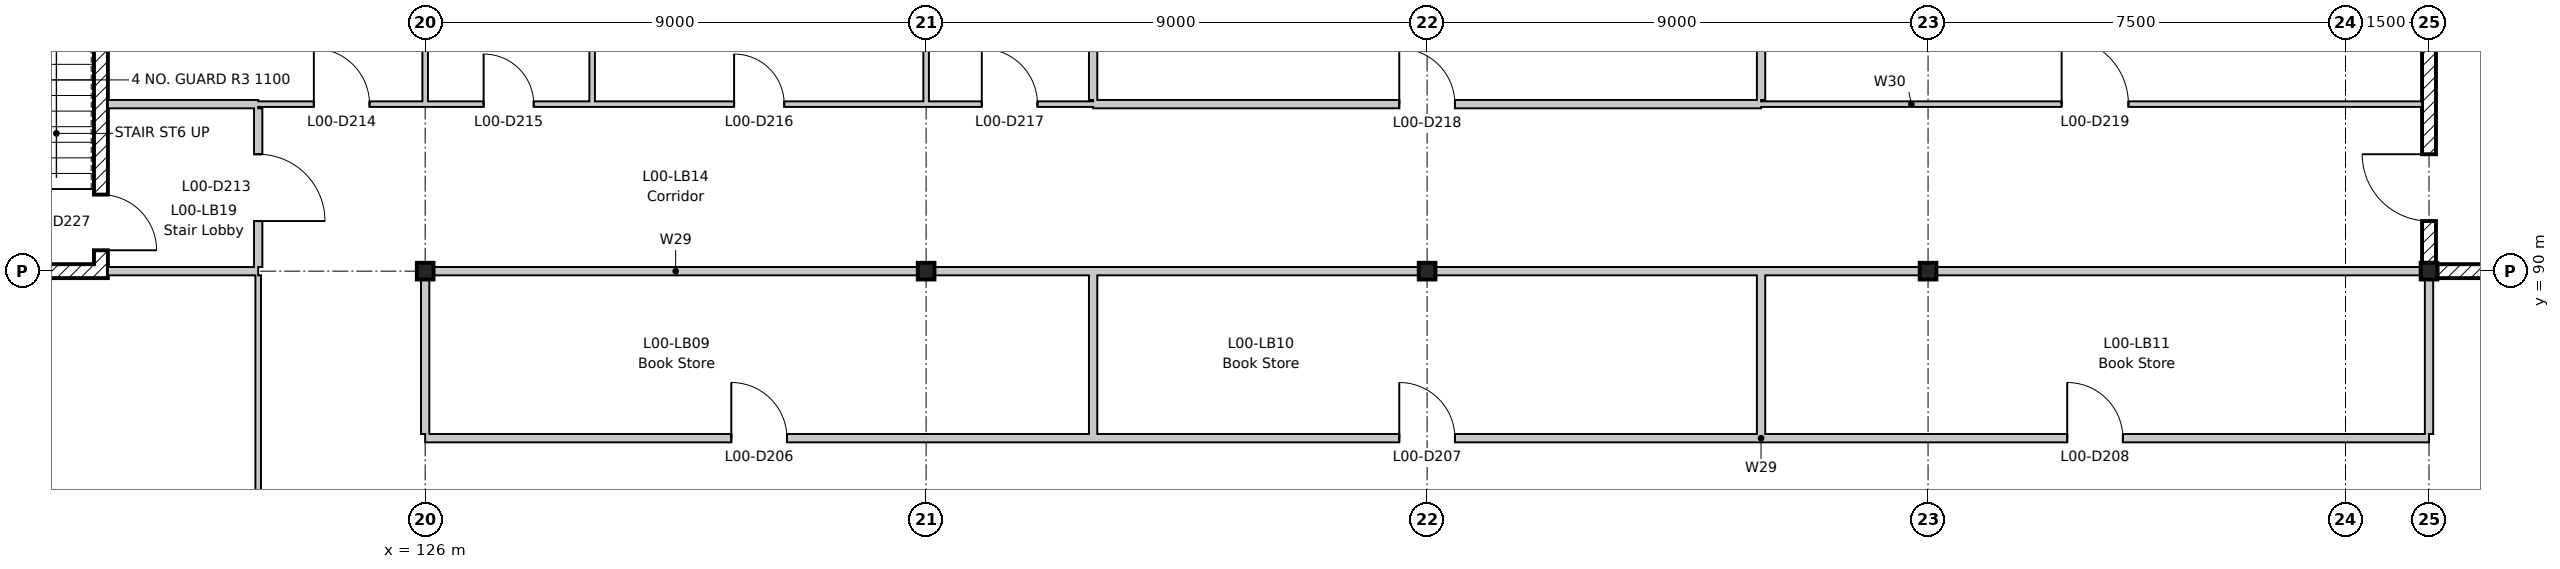
"""IFC4 building model, lengths in metres.
Left out: names, types, materials, properties, quantities, classifications, styles, units other than length and angle.
Written with IfcOpenShell. Run it as: python <this file> out.ifc"""

import sys

from ifc_helpers import new_model, si_unit, direction, frame, frame_2d, origin, origin_2d, place, context, subcontext, project, spatial, rectangle, i_section, extrude, element, fill, save


model = new_model("IFC4")
c1 = context("Model", 3, precision=1e-05, world=origin(), true_north=direction((0.0, 1.0)))
c2 = subcontext(c1, "Body", "Model", "MODEL_VIEW")
j1 = project(units=[si_unit("LENGTHUNIT", "METRE"), si_unit("PLANEANGLEUNIT", "RADIAN")], contexts=[c1])
p1 = place(None, origin())
s1 = spatial("IfcSite", under=j1, at=p1, CompositionType="ELEMENT")
p2 = place(p1, origin())
s2 = spatial("IfcBuilding", under=s1, at=p2, CompositionType="ELEMENT")
p3 = place(p2, origin())
s3 = spatial("IfcBuildingStorey", under=s2, at=p3, CompositionType="ELEMENT", Elevation=0.0)
for number, where, z_axis, x_axis in (
    (1, (126.0, 90.0, -0.6), (0.0, 0.0, 1.0), (1.0, 0.0, 0.0)),
    (2, (135.0, 90.0, -0.6), (0.0, 0.0, 1.0), (1.0, 0.0, 0.0)),
    (3, (144.0, 90.0, -0.6), (0.0, 0.0, 1.0), (1.0, 0.0, 0.0)),
    (4, (153.0, 90.0, -0.6), (0.0, 0.0, 1.0), (1.0, 0.0, 0.0)),
    (5, (162.0, 90.0, -0.6), (0.0, 0.0, 1.0), (1.0, 0.0, 0.0)),
):
    element("IfcColumn", number, at=place(p3, frame(where, z_axis=z_axis, x_axis=x_axis)), inside=s3, PredefinedType="COLUMN", context=c2, shape_type="SweptSolid", body=[
        extrude(i_section(OverallWidth=0.3, OverallDepth=0.3, WebThickness=0.011, FlangeThickness=0.019, FilletRadius=0.027, at=origin_2d()), origin(), (0.0, 0.0, 1.0), 5.8),
    ])
p4 = place(p3, frame((162.0, 98.8, 0.0), z_axis=(0.0, 0.0, 1.0), x_axis=(0.0, -1.0, 0.0)))
e6 = element("IfcWall", 6, at=p4, inside=s3, PredefinedType="SHEAR", context=c2, shape_type="SweptSolid", body=[
    extrude(rectangle(XDim=8.65, YDim=0.25, at=frame_2d((4.325, 0.0))), origin(), (0.0, 0.0, 1.0), 5.2),
])
p5 = place(p4, frame((6.7, 0.0, 0.0)))
e7 = element("IfcOpeningElement", 7, at=p5, cuts=e6, PredefinedType="OPENING", context=c2, shape_type="SweptSolid", body=[
    extrude(rectangle(XDim=1.2, YDim=2.1, at=frame_2d((0.6, 1.05))), frame((0.0, 0.135, 0.0), z_axis=(0.0, -1.0, 0.0), x_axis=(1.0, 0.0, 0.0)), (0.0, 0.0, 1.0), 0.27),
])
p6 = place(p3, frame((170.8, 90.0, 0.0), z_axis=(0.0, 0.0, 1.0), x_axis=(-1.0, 0.0, 0.0)))
e8 = element("IfcWall", 8, at=p6, inside=s3, PredefinedType="SHEAR", context=c2, shape_type="SweptSolid", body=[
    extrude(rectangle(XDim=8.65, YDim=0.25, at=frame_2d((4.325, 0.0))), origin(), (0.0, 0.0, 1.0), 5.2),
])
p7 = place(p6, frame((6.6, 0.0, 0.0)))
e9 = element("IfcOpeningElement", 9, at=p7, cuts=e8, PredefinedType="OPENING", context=c2, shape_type="SweptSolid", body=[
    extrude(rectangle(XDim=1.2, YDim=2.1, at=frame_2d((0.6, 1.05))), frame((0.0, 0.135, 0.0), z_axis=(0.0, -1.0, 0.0), x_axis=(1.0, 0.0, 0.0)), (0.0, 0.0, 1.0), 0.27),
])
p8 = place(p3, frame((120.175, 90.125, 0.0), z_axis=(0.0, 0.0, 1.0), x_axis=(0.0, 1.0, 0.0)))
e10 = element("IfcWall", 10, at=p8, inside=s3, PredefinedType="SHEAR", context=c2, shape_type="SweptSolid", body=[
    extrude(rectangle(XDim=8.675, YDim=0.25, at=frame_2d((4.337, 0.0))), origin(), (0.0, 0.0, 1.0), 5.2),
])
p9 = place(p8, frame((0.25, 0.0, 0.0)))
e11 = element("IfcOpeningElement", 11, at=p9, cuts=e10, PredefinedType="OPENING", context=c2, shape_type="SweptSolid", body=[
    extrude(rectangle(XDim=1.0, YDim=2.1, at=frame_2d((0.5, 1.05))), frame((0.0, 0.135, 0.0), z_axis=(0.0, -1.0, 0.0), x_axis=(1.0, 0.0, 0.0)), (0.0, 0.0, 1.0), 0.27),
])
p10 = place(p3, frame((117.2, 90.0, 0.0), z_axis=(0.0, 0.0, 1.0), x_axis=(1.0, 0.0, 0.0)))
e12 = element("IfcWall", 12, at=p10, inside=s3, PredefinedType="SHEAR", context=c2, shape_type="SweptSolid", body=[
    extrude(rectangle(XDim=3.1, YDim=0.25, at=frame_2d((1.55, 0.0))), origin(), (0.0, 0.0, 1.0), 4.7),
])
p11 = place(p3, frame((126.0, 87.0, 0.0), z_axis=(0.0, 0.0, 1.0), x_axis=(1.0, 0.0, 0.0)))
e13 = element("IfcWall", 13, at=p11, inside=s3, PredefinedType="PARTITIONING", context=c2, shape_type="SweptSolid", body=[
    extrude(rectangle(XDim=36.0, YDim=0.15, at=frame_2d((18.0, 0.0))), origin(), (0.0, 0.0, 1.0), 4.68),
])
p12 = place(p11, frame((5.5, 0.0, 0.0)))
e14 = element("IfcOpeningElement", 14, at=p12, cuts=e13, PredefinedType="OPENING", context=c2, shape_type="SweptSolid", body=[
    extrude(rectangle(XDim=1.0, YDim=2.1, at=frame_2d((0.5, 1.05))), frame((0.0, 0.085, 0.0), z_axis=(0.0, -1.0, 0.0), x_axis=(1.0, 0.0, 0.0)), (0.0, 0.0, 1.0), 0.17),
])
p13 = place(p11, frame((17.5, 0.0, 0.0)))
e15 = element("IfcOpeningElement", 15, at=p13, cuts=e13, PredefinedType="OPENING", context=c2, shape_type="SweptSolid", body=[
    extrude(rectangle(XDim=1.0, YDim=2.1, at=frame_2d((0.5, 1.05))), frame((0.0, 0.085, 0.0), z_axis=(0.0, -1.0, 0.0), x_axis=(1.0, 0.0, 0.0)), (0.0, 0.0, 1.0), 0.17),
])
p14 = place(p11, frame((29.5, 0.0, 0.0)))
e16 = element("IfcOpeningElement", 16, at=p14, cuts=e13, PredefinedType="OPENING", context=c2, shape_type="SweptSolid", body=[
    extrude(rectangle(XDim=1.0, YDim=2.1, at=frame_2d((0.5, 1.05))), frame((0.0, 0.085, 0.0), z_axis=(0.0, -1.0, 0.0), x_axis=(1.0, 0.0, 0.0)), (0.0, 0.0, 1.0), 0.17),
])
p15 = place(p3, frame((120.3, 90.0, 0.0), z_axis=(0.0, 0.0, 1.0), x_axis=(1.0, 0.0, 0.0)))
e17 = element("IfcWall", 17, at=p15, inside=s3, PredefinedType="PARTITIONING", context=c2, shape_type="SweptSolid", body=[
    extrude(rectangle(XDim=2.7, YDim=0.15, at=frame_2d((1.35, 0.0))), origin(), (0.0, 0.0, 1.0), 4.68),
])
for number, where, z_axis, x_axis in (
    (18, (126.15, 90.0, 0.0), (0.0, 0.0, 1.0), (1.0, 0.0, 0.0)),
    (19, (135.15, 90.0, 0.0), (0.0, 0.0, 1.0), (1.0, 0.0, 0.0)),
    (20, (144.15, 90.0, 0.0), (0.0, 0.0, 1.0), (1.0, 0.0, 0.0)),
    (21, (153.15, 90.0, 0.0), (0.0, 0.0, 1.0), (1.0, 0.0, 0.0)),
):
    element("IfcWall", number, at=place(p3, frame(where, z_axis=z_axis, x_axis=x_axis)), inside=s3, PredefinedType="PARTITIONING", context=c2, shape_type="SweptSolid", body=[
        extrude(rectangle(XDim=8.7, YDim=0.15, at=frame_2d((4.35, 0.0))), origin(), (0.0, 0.0, 1.0), 4.68),
    ])
p16 = place(p3, frame((120.3, 93.0, 0.0), z_axis=(0.0, 0.0, 1.0), x_axis=(1.0, 0.0, 0.0)))
e22 = element("IfcWall", 22, at=p16, inside=s3, PredefinedType="PARTITIONING", context=c2, shape_type="SweptSolid", body=[
    extrude(rectangle(XDim=2.7, YDim=0.15, at=frame_2d((1.35, 0.0))), origin(), (0.0, 0.0, 1.0), 4.68),
])
p17 = place(p3, frame((138.0, 93.0, 0.0), z_axis=(0.0, 0.0, 1.0), x_axis=(1.0, 0.0, 0.0)))
e23 = element("IfcWall", 23, at=p17, inside=s3, PredefinedType="PARTITIONING", context=c2, shape_type="SweptSolid", body=[
    extrude(rectangle(XDim=12.0, YDim=0.15, at=frame_2d((6.0, 0.0))), origin(), (0.0, 0.0, 1.0), 4.68),
])
p18 = place(p17, frame((5.5, 0.0, 0.0)))
e24 = element("IfcOpeningElement", 24, at=p18, cuts=e23, PredefinedType="OPENING", context=c2, shape_type="SweptSolid", body=[
    extrude(rectangle(XDim=1.0, YDim=2.1, at=frame_2d((0.5, 1.05))), frame((0.0, 0.085, 0.0), z_axis=(0.0, -1.0, 0.0), x_axis=(1.0, 0.0, 0.0)), (0.0, 0.0, 1.0), 0.17),
])
p19 = place(p3, frame((123.0, 93.0, 0.0), z_axis=(0.0, 0.0, 1.0), x_axis=(1.0, 0.0, 0.0)))
e25 = element("IfcWall", 25, at=p19, inside=s3, PredefinedType="PARTITIONING", context=c2, shape_type="SweptSolid", body=[
    extrude(rectangle(XDim=15.0, YDim=0.1, at=frame_2d((7.5, 0.0))), origin(), (0.0, 0.0, 1.0), 4.68),
])
p20 = place(p19, frame((1.0, 0.0, 0.0)))
e26 = element("IfcOpeningElement", 26, at=p20, cuts=e25, PredefinedType="OPENING", context=c2, shape_type="SweptSolid", body=[
    extrude(rectangle(XDim=1.0, YDim=2.1, at=frame_2d((0.5, 1.05))), frame((0.0, 0.06, 0.0), z_axis=(0.0, -1.0, 0.0), x_axis=(1.0, 0.0, 0.0)), (0.0, 0.0, 1.0), 0.12),
])
p21 = place(p19, frame((4.05, 0.0, 0.0)))
e27 = element("IfcOpeningElement", 27, at=p21, cuts=e25, PredefinedType="OPENING", context=c2, shape_type="SweptSolid", body=[
    extrude(rectangle(XDim=0.9, YDim=2.1, at=frame_2d((0.45, 1.05))), frame((0.0, 0.06, 0.0), z_axis=(0.0, -1.0, 0.0), x_axis=(1.0, 0.0, 0.0)), (0.0, 0.0, 1.0), 0.12),
])
p22 = place(p19, frame((8.55, 0.0, 0.0)))
e28 = element("IfcOpeningElement", 28, at=p22, cuts=e25, PredefinedType="OPENING", context=c2, shape_type="SweptSolid", body=[
    extrude(rectangle(XDim=0.9, YDim=2.1, at=frame_2d((0.45, 1.05))), frame((0.0, 0.06, 0.0), z_axis=(0.0, -1.0, 0.0), x_axis=(1.0, 0.0, 0.0)), (0.0, 0.0, 1.0), 0.12),
])
p23 = place(p19, frame((13.0, 0.0, 0.0)))
e29 = element("IfcOpeningElement", 29, at=p23, cuts=e25, PredefinedType="OPENING", context=c2, shape_type="SweptSolid", body=[
    extrude(rectangle(XDim=1.0, YDim=2.1, at=frame_2d((0.5, 1.05))), frame((0.0, 0.06, 0.0), z_axis=(0.0, -1.0, 0.0), x_axis=(1.0, 0.0, 0.0)), (0.0, 0.0, 1.0), 0.12),
])
p24 = place(p3, frame((150.0, 93.0, 0.0), z_axis=(0.0, 0.0, 1.0), x_axis=(1.0, 0.0, 0.0)))
e30 = element("IfcWall", 30, at=p24, inside=s3, PredefinedType="PARTITIONING", context=c2, shape_type="SweptSolid", body=[
    extrude(rectangle(XDim=11.875, YDim=0.1, at=frame_2d((5.938, 0.0))), origin(), (0.0, 0.0, 1.0), 4.68),
])
p25 = place(p24, frame((5.4, 0.0, 0.0)))
e31 = element("IfcOpeningElement", 31, at=p25, cuts=e30, PredefinedType="OPENING", context=c2, shape_type="SweptSolid", body=[
    extrude(rectangle(XDim=1.2, YDim=2.1, at=frame_2d((0.6, 1.05))), frame((0.0, 0.06, 0.0), z_axis=(0.0, -1.0, 0.0), x_axis=(1.0, 0.0, 0.0)), (0.0, 0.0, 1.0), 0.12),
])
p26 = place(p3, frame((123.0, 90.075, 0.0), z_axis=(0.0, 0.0, 1.0), x_axis=(0.0, 1.0, 0.0)))
e32 = element("IfcWall", 32, at=p26, inside=s3, PredefinedType="PARTITIONING", context=c2, shape_type="SweptSolid", body=[
    extrude(rectangle(XDim=2.85, YDim=0.15, at=frame_2d((1.425, 0.0))), origin(), (0.0, 0.0, 1.0), 4.68),
])
p27 = place(p26, frame((0.825, 0.0, 0.0)))
e33 = element("IfcOpeningElement", 33, at=p27, cuts=e32, PredefinedType="OPENING", context=c2, shape_type="SweptSolid", body=[
    extrude(rectangle(XDim=1.2, YDim=2.1, at=frame_2d((0.6, 1.05))), frame((0.0, 0.085, 0.0), z_axis=(0.0, -1.0, 0.0), x_axis=(1.0, 0.0, 0.0)), (0.0, 0.0, 1.0), 0.17),
])
p28 = place(p3, frame((123.0, 72.125, 0.0), z_axis=(0.0, 0.0, 1.0), x_axis=(0.0, 1.0, 0.0)))
e34 = element("IfcWall", 34, at=p28, inside=s3, PredefinedType="PARTITIONING", context=c2, shape_type="SweptSolid", body=[
    extrude(rectangle(XDim=17.8, YDim=0.1, at=frame_2d((8.9, 0.0))), origin(), (0.0, 0.0, 1.0), 4.68),
])
p29 = place(p28, frame((3.875, 0.0, 0.0)))
e35 = element("IfcOpeningElement", 35, at=p29, cuts=e34, PredefinedType="OPENING", context=c2, shape_type="SweptSolid", body=[
    extrude(rectangle(XDim=1.0, YDim=2.1, at=frame_2d((0.5, 1.05))), frame((0.0, 0.06, 0.0), z_axis=(0.0, -1.0, 0.0), x_axis=(1.0, 0.0, 0.0)), (0.0, 0.0, 1.0), 0.12),
])
p30 = place(p28, frame((12.875, 0.0, 0.0)))
e36 = element("IfcOpeningElement", 36, at=p30, cuts=e34, PredefinedType="OPENING", context=c2, shape_type="SweptSolid", body=[
    extrude(rectangle(XDim=1.0, YDim=2.1, at=frame_2d((0.5, 1.05))), frame((0.0, 0.06, 0.0), z_axis=(0.0, -1.0, 0.0), x_axis=(1.0, 0.0, 0.0)), (0.0, 0.0, 1.0), 0.12),
])
p31 = place(p3, frame((126.0, 87.075, 0.0), z_axis=(0.0, 0.0, 1.0), x_axis=(0.0, 1.0, 0.0)))
e37 = element("IfcWall", 37, at=p31, inside=s3, PredefinedType="PARTITIONING", context=c2, shape_type="SweptSolid", body=[
    extrude(rectangle(XDim=2.775, YDim=0.15, at=frame_2d((1.388, 0.0))), origin(), (0.0, 0.0, 1.0), 4.68),
])
for number, where, z_axis, x_axis in (
    (38, (126.0, 93.05, 0.0), (0.0, 0.0, 1.0), (0.0, 1.0, 0.0)),
    (39, (129.0, 93.05, 0.0), (0.0, 0.0, 1.0), (0.0, 1.0, 0.0)),
    (40, (135.0, 93.05, 0.0), (0.0, 0.0, 1.0), (0.0, 1.0, 0.0)),
):
    element("IfcWall", number, at=place(p3, frame(where, z_axis=z_axis, x_axis=x_axis)), inside=s3, PredefinedType="PARTITIONING", context=c2, shape_type="SweptSolid", body=[
        extrude(rectangle(XDim=5.75, YDim=0.1, at=frame_2d((2.875, 0.0))), origin(), (0.0, 0.0, 1.0), 4.68),
    ])
p32 = place(p3, frame((138.0, 87.075, 0.0), z_axis=(0.0, 0.0, 1.0), x_axis=(0.0, 1.0, 0.0)))
e41 = element("IfcWall", 41, at=p32, inside=s3, PredefinedType="PARTITIONING", context=c2, shape_type="SweptSolid", body=[
    extrude(rectangle(XDim=2.85, YDim=0.15, at=frame_2d((1.425, 0.0))), origin(), (0.0, 0.0, 1.0), 4.68),
])
p33 = place(p3, frame((138.0, 93.075, 0.0), z_axis=(0.0, 0.0, 1.0), x_axis=(0.0, 1.0, 0.0)))
e42 = element("IfcWall", 42, at=p33, inside=s3, PredefinedType="PARTITIONING", context=c2, shape_type="SweptSolid", body=[
    extrude(rectangle(XDim=5.725, YDim=0.15, at=frame_2d((2.863, 0.0))), origin(), (0.0, 0.0, 1.0), 4.68),
])
p34 = place(p3, frame((150.0, 87.075, 0.0), z_axis=(0.0, 0.0, 1.0), x_axis=(0.0, 1.0, 0.0)))
e43 = element("IfcWall", 43, at=p34, inside=s3, PredefinedType="PARTITIONING", context=c2, shape_type="SweptSolid", body=[
    extrude(rectangle(XDim=2.85, YDim=0.15, at=frame_2d((1.425, 0.0))), origin(), (0.0, 0.0, 1.0), 4.68),
])
p35 = place(p3, frame((150.0, 93.075, 0.0), z_axis=(0.0, 0.0, 1.0), x_axis=(0.0, 1.0, 0.0)))
e44 = element("IfcWall", 44, at=p35, inside=s3, PredefinedType="PARTITIONING", context=c2, shape_type="SweptSolid", body=[
    extrude(rectangle(XDim=5.725, YDim=0.15, at=frame_2d((2.863, 0.0))), origin(), (0.0, 0.0, 1.0), 4.68),
])
p36 = place(p3, frame((162.0, 87.075, 0.0), z_axis=(0.0, 0.0, 1.0), x_axis=(0.0, 1.0, 0.0)))
e45 = element("IfcWall", 45, at=p36, inside=s3, PredefinedType="PARTITIONING", context=c2, shape_type="SweptSolid", body=[
    extrude(rectangle(XDim=2.775, YDim=0.15, at=frame_2d((1.388, 0.0))), origin(), (0.0, 0.0, 1.0), 4.68),
])
p37 = place(p12, origin())
e46 = element("IfcDoor", 46, at=p37, inside=s3, OperationType="SINGLE_SWING_LEFT", PredefinedType="DOOR", context=c2, shape_type="SweptSolid", body=[
    extrude(rectangle(XDim=1.0, YDim=2.1, at=frame_2d((0.5, 1.05))), frame((0.0, 0.025, 0.0), z_axis=(0.0, -1.0, 0.0), x_axis=(1.0, 0.0, 0.0)), (0.0, 0.0, 1.0), 0.05),
])
fill(e14, e46)
p38 = place(p13, origin())
e47 = element("IfcDoor", 47, at=p38, inside=s3, OperationType="SINGLE_SWING_LEFT", PredefinedType="DOOR", context=c2, shape_type="SweptSolid", body=[
    extrude(rectangle(XDim=1.0, YDim=2.1, at=frame_2d((0.5, 1.05))), frame((0.0, 0.025, 0.0), z_axis=(0.0, -1.0, 0.0), x_axis=(1.0, 0.0, 0.0)), (0.0, 0.0, 1.0), 0.05),
])
fill(e15, e47)
p39 = place(p14, origin())
e48 = element("IfcDoor", 48, at=p39, inside=s3, OperationType="SINGLE_SWING_LEFT", PredefinedType="DOOR", context=c2, shape_type="SweptSolid", body=[
    extrude(rectangle(XDim=1.0, YDim=2.1, at=frame_2d((0.5, 1.05))), frame((0.0, 0.025, 0.0), z_axis=(0.0, -1.0, 0.0), x_axis=(1.0, 0.0, 0.0)), (0.0, 0.0, 1.0), 0.05),
])
fill(e16, e48)
p40 = place(p27, frame((1.2, 0.0, 0.0), z_axis=(0.0, 0.0, 1.0), x_axis=(-1.0, 0.0, 0.0)))
e49 = element("IfcDoor", 49, at=p40, inside=s3, OperationType="SINGLE_SWING_RIGHT", PredefinedType="DOOR", context=c2, shape_type="SweptSolid", body=[
    extrude(rectangle(XDim=1.2, YDim=2.1, at=frame_2d((0.6, 1.05))), frame((0.0, 0.025, 0.0), z_axis=(0.0, -1.0, 0.0), x_axis=(1.0, 0.0, 0.0)), (0.0, 0.0, 1.0), 0.05),
])
fill(e33, e49)
p41 = place(p20, origin())
e50 = element("IfcDoor", 50, at=p41, inside=s3, OperationType="SINGLE_SWING_LEFT", PredefinedType="DOOR", context=c2, shape_type="SweptSolid", body=[
    extrude(rectangle(XDim=1.0, YDim=2.1, at=frame_2d((0.5, 1.05))), frame((0.0, 0.025, 0.0), z_axis=(0.0, -1.0, 0.0), x_axis=(1.0, 0.0, 0.0)), (0.0, 0.0, 1.0), 0.05),
])
fill(e26, e50)
p42 = place(p21, origin())
e51 = element("IfcDoor", 51, at=p42, inside=s3, OperationType="SINGLE_SWING_LEFT", PredefinedType="DOOR", context=c2, shape_type="SweptSolid", body=[
    extrude(rectangle(XDim=0.9, YDim=2.1, at=frame_2d((0.45, 1.05))), frame((0.0, 0.025, 0.0), z_axis=(0.0, -1.0, 0.0), x_axis=(1.0, 0.0, 0.0)), (0.0, 0.0, 1.0), 0.05),
])
fill(e27, e51)
p43 = place(p22, origin())
e52 = element("IfcDoor", 52, at=p43, inside=s3, OperationType="SINGLE_SWING_LEFT", PredefinedType="DOOR", context=c2, shape_type="SweptSolid", body=[
    extrude(rectangle(XDim=0.9, YDim=2.1, at=frame_2d((0.45, 1.05))), frame((0.0, 0.025, 0.0), z_axis=(0.0, -1.0, 0.0), x_axis=(1.0, 0.0, 0.0)), (0.0, 0.0, 1.0), 0.05),
])
fill(e28, e52)
p44 = place(p23, origin())
e53 = element("IfcDoor", 53, at=p44, inside=s3, OperationType="SINGLE_SWING_LEFT", PredefinedType="DOOR", context=c2, shape_type="SweptSolid", body=[
    extrude(rectangle(XDim=1.0, YDim=2.1, at=frame_2d((0.5, 1.05))), frame((0.0, 0.025, 0.0), z_axis=(0.0, -1.0, 0.0), x_axis=(1.0, 0.0, 0.0)), (0.0, 0.0, 1.0), 0.05),
])
fill(e29, e53)
p45 = place(p18, origin())
e54 = element("IfcDoor", 54, at=p45, inside=s3, OperationType="SINGLE_SWING_LEFT", PredefinedType="DOOR", context=c2, shape_type="SweptSolid", body=[
    extrude(rectangle(XDim=1.0, YDim=2.1, at=frame_2d((0.5, 1.05))), frame((0.0, 0.025, 0.0), z_axis=(0.0, -1.0, 0.0), x_axis=(1.0, 0.0, 0.0)), (0.0, 0.0, 1.0), 0.05),
])
fill(e24, e54)
p46 = place(p25, origin())
e55 = element("IfcDoor", 55, at=p46, inside=s3, OperationType="SINGLE_SWING_LEFT", PredefinedType="DOOR", context=c2, shape_type="SweptSolid", body=[
    extrude(rectangle(XDim=1.2, YDim=2.1, at=frame_2d((0.6, 1.05))), frame((0.0, 0.025, 0.0), z_axis=(0.0, -1.0, 0.0), x_axis=(1.0, 0.0, 0.0)), (0.0, 0.0, 1.0), 0.05),
])
fill(e31, e55)
p47 = place(p5, frame((1.2, 0.0, 0.0), z_axis=(0.0, 0.0, 1.0), x_axis=(-1.0, 0.0, 0.0)))
e56 = element("IfcDoor", 56, at=p47, inside=s3, OperationType="SINGLE_SWING_RIGHT", PredefinedType="DOOR", context=c2, shape_type="SweptSolid", body=[
    extrude(rectangle(XDim=1.2, YDim=2.1, at=frame_2d((0.6, 1.05))), frame((0.0, 0.025, 0.0), z_axis=(0.0, -1.0, 0.0), x_axis=(1.0, 0.0, 0.0)), (0.0, 0.0, 1.0), 0.05),
])
fill(e7, e56)
p48 = place(p9, frame((1.0, 0.0, 0.0), z_axis=(0.0, 0.0, 1.0), x_axis=(-1.0, 0.0, 0.0)))
e57 = element("IfcDoor", 57, at=p48, inside=s3, OperationType="SINGLE_SWING_RIGHT", PredefinedType="DOOR", context=c2, shape_type="SweptSolid", body=[
    extrude(rectangle(XDim=1.0, YDim=2.1, at=frame_2d((0.5, 1.05))), frame((0.0, 0.025, 0.0), z_axis=(0.0, -1.0, 0.0), x_axis=(1.0, 0.0, 0.0)), (0.0, 0.0, 1.0), 0.05),
])
fill(e11, e57)
save(model, sys.argv[1])
